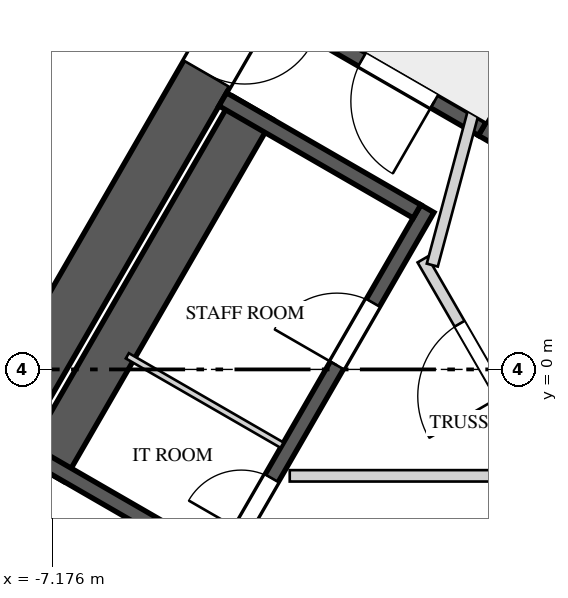
"""IFC4 building model, lengths in metres.
Left out: names, types, materials, properties, quantities, classifications, styles, units other than length and angle.
Written with IfcOpenShell. Run it as: python <this file> out.ifc"""

import sys

from ifc_helpers import new_model, si_unit, direction, frame, frame_2d, origin, place, context, subcontext, project, spatial, rectangle, extrude, element, fill, save


model = new_model("IFC4")
c1 = context("Model", 3, precision=1e-05, world=origin(), true_north=direction((0.0, 1.0)))
c2 = subcontext(c1, "Body", "Model", "MODEL_VIEW")
j1 = project(units=[si_unit("LENGTHUNIT", "METRE"), si_unit("PLANEANGLEUNIT", "RADIAN")], contexts=[c1])
p1 = place(None, origin())
s1 = spatial("IfcSite", under=j1, at=p1, CompositionType="ELEMENT")
p2 = place(p1, origin())
s2 = spatial("IfcBuilding", under=s1, at=p2, CompositionType="ELEMENT")
p3 = place(p2, frame((0.0, 0.0, 269.2)))
s3 = spatial("IfcBuildingStorey", under=s2, at=p3, CompositionType="ELEMENT", Elevation=269.2)
p4 = place(p3, frame((-1.241, 10.65, 0.0), z_axis=(0.0, 0.0, 1.0), x_axis=(-0.500003331888, -0.866023480109, 0.0)))
e1 = element("IfcWall", 1, at=p4, inside=s3, PredefinedType="SHEAR", context=c2, shape_type="SweptSolid", body=[
    extrude(rectangle(XDim=17.205, YDim=0.7, at=frame_2d((8.603, 0.0))), origin(), (0.0, 0.0, 1.0), 5.2),
])
p5 = place(p4, frame((6.808, 0.0, 0.0)))
e2 = element("IfcOpeningElement", 2, at=p5, cuts=e1, PredefinedType="OPENING", context=c2, shape_type="SweptSolid", body=[
    extrude(rectangle(XDim=1.0, YDim=2.4, at=frame_2d((0.5, 1.2))), frame((0.0, 0.36, 0.0), z_axis=(0.0, -1.0, 0.0), x_axis=(1.0, 0.0, 0.0)), (0.0, 0.0, 1.0), 0.72),
])
p6 = place(p3, frame((1.876, 8.85, 0.0), z_axis=(0.0, 0.0, 1.0), x_axis=(-0.499998042495, -0.866026533947, 0.0)))
e3 = element("IfcWall", 3, at=p6, inside=s3, PredefinedType="SOLIDWALL", context=c2, shape_type="SweptSolid", body=[
    extrude(rectangle(XDim=6.723, YDim=0.2, at=frame_2d((3.361, 0.0))), origin(), (0.0, 0.0, 1.0), 4.85),
])
p7 = place(p3, frame((-1.521, 3.165, 0.0), z_axis=(0.0, 0.0, 1.0), x_axis=(-0.866035871367, 0.499981869177, 0.0)))
e4 = element("IfcWall", 4, at=p7, inside=s3, PredefinedType="SOLIDWALL", context=c2, shape_type="SweptSolid", body=[
    extrude(rectangle(XDim=3.15, YDim=0.2, at=frame_2d((1.575, 0.0))), origin(), (0.0, 0.0, 1.0), 4.85),
])
p8 = place(p7, frame((0.725, 0.0, 0.0)))
e5 = element("IfcOpeningElement", 5, at=p8, cuts=e4, PredefinedType="OPENING", context=c2, shape_type="SweptSolid", body=[
    extrude(rectangle(XDim=1.1, YDim=2.4, at=frame_2d((0.55, 1.2))), frame((0.0, 0.11, 0.0), z_axis=(0.0, -1.0, 0.0), x_axis=(1.0, 0.0, 0.0)), (0.0, 0.0, 1.0), 0.22),
])
p9 = place(p3, frame((-4.993, -2.648, 0.0), z_axis=(0.0, 0.0, 1.0), x_axis=(0.499996545922, 0.866027397988, 0.0)))
e6 = element("IfcWall", 6, at=p9, inside=s3, PredefinedType="SOLIDWALL", context=c2, shape_type="SweptSolid", body=[
    extrude(rectangle(XDim=5.5, YDim=0.2, at=frame_2d((2.75, 0.0))), origin(), (0.0, 0.0, 1.0), 4.85),
])
p10 = place(p9, frame((3.12, 0.0, 0.0)))
e7 = element("IfcOpeningElement", 7, at=p10, cuts=e6, PredefinedType="OPENING", context=c2, shape_type="SweptSolid", body=[
    extrude(rectangle(XDim=0.95, YDim=2.4, at=frame_2d((0.475, 1.2))), frame((0.0, 0.11, 0.0), z_axis=(0.0, -1.0, 0.0), x_axis=(1.0, 0.0, 0.0)), (0.0, 0.0, 1.0), 0.22),
])
p11 = place(p9, frame((0.605, 0.0, 0.0)))
e8 = element("IfcOpeningElement", 8, at=p11, cuts=e6, PredefinedType="OPENING", context=c2, shape_type="SweptSolid", body=[
    extrude(rectangle(XDim=0.8, YDim=2.1, at=frame_2d((0.4, 1.05))), frame((0.0, 0.11, 0.0), z_axis=(0.0, -1.0, 0.0), x_axis=(1.0, 0.0, 0.0)), (0.0, 0.0, 1.0), 0.22),
])
p12 = place(p3, frame((-4.538, 3.44, 0.0), z_axis=(0.0, 0.0, 1.0), x_axis=(-0.499996545922, -0.866027397988, 0.0)))
e9 = element("IfcWall", 9, at=p12, inside=s3, PredefinedType="SOLIDWALL", context=c2, shape_type="SweptSolid", body=[
    extrude(rectangle(XDim=5.5, YDim=0.6, at=frame_2d((2.75, 0.0))), origin(), (0.0, 0.0, 1.0), 4.85),
])
for number, where, z_axis, x_axis in (
    (10, (-2.38, 2.078, 0.0), (0.0, 0.0, 1.0), (-0.866, 0.5, 0.0)),
    (11, (-5.03, -2.512, 0.0), (0.0, 0.0, 1.0), (-0.866, 0.5, 0.0)),
):
    element("IfcWall", number, at=place(p3, frame(where, z_axis=z_axis, x_axis=x_axis)), inside=s3, PredefinedType="SOLIDWALL", context=c2, shape_type="SweptSolid", body=[
        extrude(rectangle(XDim=2.95, YDim=0.2, at=frame_2d((1.475, 0.0))), origin(), (0.0, 0.0, 1.0), 4.85),
    ])
p13 = place(p3, frame((-4.155, -0.996, 0.0), z_axis=(0.0, 0.0, 1.0), x_axis=(-0.866016039709, 0.500016218704, 0.0)))
e12 = element("IfcWall", 12, at=p13, inside=s3, PredefinedType="PARTITIONING", context=c2, shape_type="SweptSolid", body=[
    extrude(rectangle(XDim=2.35, YDim=0.08, at=frame_2d((1.175, 0.0))), origin(), (0.0, 0.0, 1.0), 4.85),
])
p14 = place(p3, frame((-0.744, -1.261, 0.0), z_axis=(0.0, 0.0, 1.0), x_axis=(-0.500004234368, 0.866022959057, 0.0)))
e13 = element("IfcWall", 13, at=p14, inside=s3, PredefinedType="PARTITIONING", context=c2, shape_type="SweptSolid", body=[
    extrude(rectangle(XDim=3.125, YDim=0.15, at=frame_2d((1.562, 0.0))), origin(), (0.0, 0.0, 1.0), 4.85),
])
p15 = place(p14, frame((1.05, 0.0, 0.0)))
e14 = element("IfcOpeningElement", 14, at=p15, cuts=e13, PredefinedType="OPENING", context=c2, shape_type="SweptSolid", body=[
    extrude(rectangle(XDim=1.1, YDim=2.4, at=frame_2d((0.55, 1.2))), frame((0.0, 0.085, 0.0), z_axis=(0.0, -1.0, 0.0), x_axis=(1.0, 0.0, 0.0)), (0.0, 0.0, 1.0), 0.17),
])
p16 = place(p3, frame((-2.178, 1.372, 0.0), z_axis=(0.0, 0.0, 1.0), x_axis=(0.258808958833, 0.96592852884, 0.0)))
e15 = element("IfcWall", 15, at=p16, inside=s3, PredefinedType="PARTITIONING", context=c2, shape_type="SweptSolid", body=[
    extrude(rectangle(XDim=2.903, YDim=0.15, at=frame_2d((1.451, 0.0))), origin(), (0.0, 0.0, 1.0), 4.85),
])
p17 = place(p3, frame((-1.51, 4.215, 0.0), z_axis=(0.0, 0.0, 1.0), x_axis=(0.866085525409, 0.49989585183, 0.0)))
e16 = element("IfcWall", 16, at=p17, inside=s3, PredefinedType="PARTITIONING", context=c2, shape_type="SweptSolid", body=[
    extrude(rectangle(XDim=1.3, YDim=0.15, at=frame_2d((0.65, 0.0))), origin(), (0.0, 0.0, 1.0), 4.85),
])
p18 = place(p3, frame((-4.053, -1.4, 0.0), z_axis=(0.0, 0.0, 1.0), x_axis=(1.0, 0.0, 0.0)))
e17 = element("IfcWall", 17, at=p18, inside=s3, PredefinedType="PARTITIONING", context=c2, shape_type="SweptSolid", body=[
    extrude(rectangle(XDim=7.876, YDim=0.15, at=frame_2d((3.938, 0.0))), origin(), (0.0, 0.0, 1.0), 4.85),
])
p19 = place(p3, frame((-8.941, 1.613, 0.0), z_axis=(0.0, 0.0, 1.0), x_axis=(0.499973847261, 0.866040502549, 0.0)))
e18 = element("IfcWall", 18, at=p19, inside=s3, PredefinedType="SOLIDWALL", context=c2, shape_type="SweptSolid", body=[
    extrude(rectangle(XDim=5.156, YDim=0.2, at=frame_2d((2.578, 0.0))), origin(), (0.0, 0.0, 1.0), 4.85),
])
p20 = place(p8, origin())
e19 = element("IfcDoor", 19, at=p20, inside=s3, OperationType="SINGLE_SWING_RIGHT", PredefinedType="DOOR", context=c2, shape_type="SweptSolid", body=[
    extrude(rectangle(XDim=1.1, YDim=2.4, at=frame_2d((0.55, 1.2))), frame((0.0, 0.025, 0.0), z_axis=(0.0, -1.0, 0.0), x_axis=(1.0, 0.0, 0.0)), (0.0, 0.0, 1.0), 0.05),
])
fill(e5, e19)
p21 = place(p10, origin())
e20 = element("IfcDoor", 20, at=p21, inside=s3, OperationType="SINGLE_SWING_LEFT", PredefinedType="DOOR", context=c2, shape_type="SweptSolid", body=[
    extrude(rectangle(XDim=0.95, YDim=2.4, at=frame_2d((0.475, 1.2))), frame((0.0, 0.025, 0.0), z_axis=(0.0, -1.0, 0.0), x_axis=(1.0, 0.0, 0.0)), (0.0, 0.0, 1.0), 0.05),
])
fill(e7, e20)
p22 = place(p11, origin())
e21 = element("IfcDoor", 21, at=p22, inside=s3, OperationType="SINGLE_SWING_RIGHT", PredefinedType="DOOR", context=c2, shape_type="SweptSolid", body=[
    extrude(rectangle(XDim=0.8, YDim=2.1, at=frame_2d((0.4, 1.05))), frame((0.0, 0.025, 0.0), z_axis=(0.0, -1.0, 0.0), x_axis=(1.0, 0.0, 0.0)), (0.0, 0.0, 1.0), 0.05),
])
fill(e8, e21)
p23 = place(p15, origin())
e22 = element("IfcDoor", 22, at=p23, inside=s3, OperationType="SINGLE_SWING_LEFT", PredefinedType="DOOR", context=c2, shape_type="SweptSolid", body=[
    extrude(rectangle(XDim=1.1, YDim=2.4, at=frame_2d((0.55, 1.2))), frame((0.0, 0.025, 0.0), z_axis=(0.0, -1.0, 0.0), x_axis=(1.0, 0.0, 0.0)), (0.0, 0.0, 1.0), 0.05),
])
fill(e14, e22)
p24 = place(p5, origin())
e23 = element("IfcDoor", 23, at=p24, inside=s3, OperationType="SINGLE_SWING_RIGHT", PredefinedType="DOOR", context=c2, shape_type="SweptSolid", body=[
    extrude(rectangle(XDim=1.0, YDim=2.4, at=frame_2d((0.5, 1.2))), frame((0.0, 0.025, 0.0), z_axis=(0.0, -1.0, 0.0), x_axis=(1.0, 0.0, 0.0)), (0.0, 0.0, 1.0), 0.05),
])
fill(e2, e23)
save(model, sys.argv[1])
